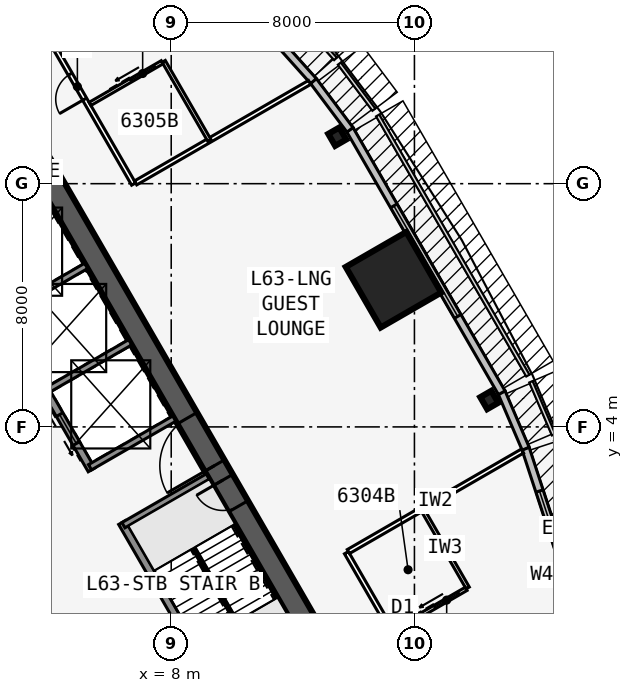
"""IFC4 building model, lengths in metres.
Left out: names, types, materials, properties, quantities, classifications, styles, units other than length and angle.
Written with IfcOpenShell. Run it as: python <this file> out.ifc"""

import sys

from ifc_helpers import new_model, si_unit, direction, frame, frame_2d, origin, origin_2d, place, context, subcontext, project, spatial, rectangle, i_section, extrude, element, fill, save


model = new_model("IFC4")
c1 = context("Model", 3, precision=1e-05, world=origin(), true_north=direction((0.0, 1.0)))
c2 = subcontext(c1, "Body", "Model", "MODEL_VIEW")
j1 = project(units=[si_unit("LENGTHUNIT", "METRE"), si_unit("PLANEANGLEUNIT", "RADIAN")], contexts=[c1])
p1 = place(None, origin())
s1 = spatial("IfcSite", under=j1, at=p1, CompositionType="ELEMENT")
p2 = place(p1, origin())
s2 = spatial("IfcBuilding", under=s1, at=p2, CompositionType="ELEMENT")
p3 = place(p2, frame((0.0, 0.0, 239.3)))
s3 = spatial("IfcBuildingStorey", under=s2, at=p3, CompositionType="ELEMENT", Elevation=239.3)
p4 = place(p3, frame((16.5, -9.526, 0.0), z_axis=(0.0, 0.0, 1.0), x_axis=(-0.499999749417, 0.866025548458, 0.0)))
e1 = element("IfcWall", 1, at=p4, inside=s3, PredefinedType="SHEAR", context=c2, shape_type="SweptSolid", body=[
    extrude(rectangle(XDim=33.0, YDim=0.75, at=frame_2d((16.5, 0.0))), origin(), (0.0, 0.0, 1.0), 3.6),
])
p5 = place(p4, frame((14.15, 0.0, 0.0)))
e2 = element("IfcOpeningElement", 2, at=p5, cuts=e1, PredefinedType="OPENING", context=c2, shape_type="SweptSolid", body=[
    extrude(rectangle(XDim=1.8, YDim=2.13, at=frame_2d((0.9, 1.065))), frame((0.0, 0.385, 0.0), z_axis=(0.0, -1.0, 0.0), x_axis=(1.0, 0.0, 0.0)), (0.0, 0.0, 1.0), 0.77),
])
p6 = place(p4, frame((12.6, 0.0, 0.0)))
e3 = element("IfcOpeningElement", 3, at=p6, cuts=e1, PredefinedType="OPENING", context=c2, shape_type="SweptSolid", body=[
    extrude(rectangle(XDim=1.0, YDim=2.13, at=frame_2d((0.5, 1.065))), frame((0.0, 0.385, 0.0), z_axis=(0.0, -1.0, 0.0), x_axis=(1.0, 0.0, 0.0)), (0.0, 0.0, 1.0), 0.77),
])
p7 = place(p3, frame((10.245, -5.843, 0.0), z_axis=(0.0, 0.0, 1.0), x_axis=(-0.499993009313, 0.866029439822, 0.0)))
e4 = element("IfcWall", 4, at=p7, inside=s3, PredefinedType="SOLIDWALL", context=c2, shape_type="SweptSolid", body=[
    extrude(rectangle(XDim=7.733, YDim=0.25, at=frame_2d((3.866, 0.0))), origin(), (0.0, 0.0, 1.0), 3.435),
])
p8 = place(p3, frame((5.379, 2.586, 0.0), z_axis=(0.0, 0.0, 1.0), x_axis=(-0.500001375892, 0.866024609411, 0.0)))
e5 = element("IfcWall", 5, at=p8, inside=s3, PredefinedType="SOLIDWALL", context=c2, shape_type="SweptSolid", body=[
    extrude(rectangle(XDim=10.633, YDim=0.25, at=frame_2d((5.316, 0.0))), origin(), (0.0, 0.0, 1.0), 3.435),
])
p9 = place(p8, frame((9.164, 0.0, 0.0)))
e6 = element("IfcOpeningElement", 6, at=p9, cuts=e5, PredefinedType="OPENING", context=c2, shape_type="SweptSolid", body=[
    extrude(rectangle(XDim=0.9, YDim=2.13, at=frame_2d((0.45, 1.065))), frame((0.0, 0.135, 0.0), z_axis=(0.0, -1.0, 0.0), x_axis=(1.0, 0.0, 0.0)), (0.0, 0.0, 1.0), 0.27),
])
p10 = place(p8, frame((1.0, 0.0, 0.0)))
e7 = element("IfcOpeningElement", 7, at=p10, cuts=e5, PredefinedType="OPENING", context=c2, shape_type="SweptSolid", body=[
    extrude(rectangle(XDim=1.1, YDim=2.13, at=frame_2d((0.55, 1.065))), frame((0.0, 0.135, 0.0), z_axis=(0.0, -1.0, 0.0), x_axis=(1.0, 0.0, 0.0)), (0.0, 0.0, 1.0), 0.27),
])
p11 = place(p8, frame((3.9, 0.0, 0.0)))
e8 = element("IfcOpeningElement", 8, at=p11, cuts=e5, PredefinedType="OPENING", context=c2, shape_type="SweptSolid", body=[
    extrude(rectangle(XDim=1.1, YDim=2.13, at=frame_2d((0.55, 1.065))), frame((0.0, 0.135, 0.0), z_axis=(0.0, -1.0, 0.0), x_axis=(1.0, 0.0, 0.0)), (0.0, 0.0, 1.0), 0.27),
])
p12 = place(p8, frame((6.8, 0.0, 0.0)))
e9 = element("IfcOpeningElement", 9, at=p12, cuts=e5, PredefinedType="OPENING", context=c2, shape_type="SweptSolid", body=[
    extrude(rectangle(XDim=1.1, YDim=2.13, at=frame_2d((0.55, 1.065))), frame((0.0, 0.135, 0.0), z_axis=(0.0, -1.0, 0.0), x_axis=(1.0, 0.0, 0.0)), (0.0, 0.0, 1.0), 0.27),
])
p13 = place(p3, frame((6.429, 0.767, 0.0), z_axis=(0.0, 0.0, 1.0), x_axis=(0.866042017984, 0.499971222258, 0.0)))
e10 = element("IfcWall", 10, at=p13, inside=s3, PredefinedType="SOLIDWALL", context=c2, shape_type="SweptSolid", body=[
    extrude(rectangle(XDim=3.2, YDim=0.2, at=frame_2d((1.6, 0.0))), origin(), (0.0, 0.0, 1.0), 3.435),
])
p14 = place(p3, frame((5.329, 2.673, 0.0), z_axis=(0.0, 0.0, 1.0), x_axis=(0.866022944154, 0.50000426018, 0.0)))
e11 = element("IfcWall", 11, at=p14, inside=s3, PredefinedType="SOLIDWALL", context=c2, shape_type="SweptSolid", body=[
    extrude(rectangle(XDim=3.2, YDim=0.2, at=frame_2d((1.6, 0.0))), origin(), (0.0, 0.0, 1.0), 3.435),
])
for number, where, z_axis, x_axis in (
    (12, (3.879, 5.184, 0.0), (0.0, 0.0, 1.0), (0.866, 0.5, 0.0)),
    (13, (2.429, 7.696, 0.0), (0.0, 0.0, 1.0), (0.866, 0.5, 0.0)),
):
    element("IfcWall", number, at=place(p3, frame(where, z_axis=z_axis, x_axis=x_axis)), inside=s3, PredefinedType="SOLIDWALL", context=c2, shape_type="SweptSolid", body=[
        extrude(rectangle(XDim=3.2, YDim=0.2, at=frame_2d((1.6, 0.0))), origin(), (0.0, 0.0, 1.0), 3.435),
    ])
for number, where, z_axis, x_axis in (
    (14, (18.461, 4.885, 0.0), (0.0, 0.0, 1.0), (0.866, 0.5, 0.0)),
    (15, (13.461, 13.545, 0.0), (0.0, 0.0, 1.0), (0.866, 0.5, 0.0)),
):
    element("IfcColumn", number, at=place(p3, frame(where, z_axis=z_axis, x_axis=x_axis)), inside=s3, PredefinedType="COLUMN", context=c2, shape_type="SweptSolid", body=[
        extrude(i_section(OverallWidth=0.419, OverallDepth=0.455, WebThickness=0.042, FlangeThickness=0.068, at=origin_2d()), origin(), (0.0, 0.0, 1.0), 3.6),
    ])
p15 = place(p3, frame((15.312, 8.84, 0.0), z_axis=(0.0, 0.0, 1.0), x_axis=(0.866025403784, 0.5, 0.0)))
e16 = element("IfcColumn", 16, at=p15, inside=s3, PredefinedType="COLUMN", context=c2, shape_type="SweptSolid", body=[
    extrude(rectangle(XDim=2.3, YDim=2.3, at=origin_2d()), origin(), (0.0, 0.0, 1.0), 3.6),
])
p16 = place(p3, frame((21.881, -3.503, 0.0), z_axis=(0.0, 0.0, 1.0), x_axis=(-0.311328857048, 0.95030223759, 0.0)))
e17 = element("IfcWall", 17, at=p16, inside=s3, PredefinedType="STANDARD", context=c2, shape_type="SweptSolid", body=[
    extrude(rectangle(XDim=7.153, YDim=0.25, at=frame_2d((3.576, 0.0))), origin(), (0.0, 0.0, 1.0), 3.435),
])
p17 = place(p16, frame((1.476, 0.0, 0.45)))
e18 = element("IfcOpeningElement", 18, at=p17, cuts=e17, PredefinedType="OPENING", context=c2, shape_type="SweptSolid", body=[
    extrude(rectangle(XDim=4.2, YDim=2.6, at=frame_2d((2.1, 1.3))), frame((0.0, 0.135, 0.0), z_axis=(0.0, -1.0, 0.0), x_axis=(1.0, 0.0, 0.0)), (0.0, 0.0, 1.0), 0.27),
])
p18 = place(p3, frame((19.658, 3.284, 0.0), z_axis=(0.0, 0.0, 1.0), x_axis=(-0.393290226175, 0.91941437774, 0.0)))
e19 = element("IfcWall", 19, at=p18, inside=s3, PredefinedType="STANDARD", context=c2, shape_type="SweptSolid", body=[
    extrude(rectangle(XDim=2.014, YDim=0.25, at=frame_2d((1.007, 0.0))), origin(), (0.0, 0.0, 1.0), 3.435),
])
p19 = place(p3, frame((18.873, 5.123, 0.0), z_axis=(0.0, 0.0, 1.0), x_axis=(-0.499993662806, 0.866029062534, 0.0)))
e20 = element("IfcWall", 20, at=p19, inside=s3, PredefinedType="STANDARD", context=c2, shape_type="SweptSolid", body=[
    extrude(rectangle(XDim=10.0, YDim=0.25, at=frame_2d((5.0, 0.0))), origin(), (0.0, 0.0, 1.0), 3.435),
])
p20 = place(p19, frame((2.9, 0.0, 0.45)))
e21 = element("IfcOpeningElement", 21, at=p20, cuts=e20, PredefinedType="OPENING", context=c2, shape_type="SweptSolid", body=[
    extrude(rectangle(XDim=4.2, YDim=2.6, at=frame_2d((2.1, 1.3))), frame((0.0, 0.135, 0.0), z_axis=(0.0, -1.0, 0.0), x_axis=(1.0, 0.0, 0.0)), (0.0, 0.0, 1.0), 0.27),
])
p21 = place(p3, frame((13.881, 13.771, 0.0), z_axis=(0.0, 0.0, 1.0), x_axis=(-0.599650843534, 0.800261748335, 0.0)))
e22 = element("IfcWall", 22, at=p21, inside=s3, PredefinedType="STANDARD", context=c2, shape_type="SweptSolid", body=[
    extrude(rectangle(XDim=2.014, YDim=0.25, at=frame_2d((1.007, 0.0))), origin(), (0.0, 0.0, 1.0), 3.435),
])
p22 = place(p3, frame((12.68, 15.374, 0.0), z_axis=(0.0, 0.0, 1.0), x_axis=(-0.667303550892, 0.744785855778, 0.0)))
e23 = element("IfcWall", 23, at=p22, inside=s3, PredefinedType="STANDARD", context=c2, shape_type="SweptSolid", body=[
    extrude(rectangle(XDim=7.153, YDim=0.25, at=frame_2d((3.576, 0.0))), origin(), (0.0, 0.0, 1.0), 3.435),
])
p23 = place(p22, frame((1.476, 0.0, 0.45)))
e24 = element("IfcOpeningElement", 24, at=p23, cuts=e23, PredefinedType="OPENING", context=c2, shape_type="SweptSolid", body=[
    extrude(rectangle(XDim=4.2, YDim=2.6, at=frame_2d((2.1, 1.3))), frame((0.0, 0.135, 0.0), z_axis=(0.0, -1.0, 0.0), x_axis=(1.0, 0.0, 0.0)), (0.0, 0.0, 1.0), 0.27),
])
p24 = place(p3, frame((20.102, -11.115, 0.0), z_axis=(0.0, 0.0, 1.0), x_axis=(-0.500001960654, 0.866024271797, 0.0)))
e25 = element("IfcWall", 25, at=p24, inside=s3, PredefinedType="PARTITIONING", context=c2, shape_type="SweptSolid", body=[
    extrude(rectangle(XDim=12.677, YDim=0.15, at=frame_2d((6.339, 0.0))), origin(), (0.0, 0.0, 1.0), 3.435),
])
p25 = place(p24, frame((8.502, 0.0, 0.0)))
e26 = element("IfcOpeningElement", 26, at=p25, cuts=e25, PredefinedType="OPENING", context=c2, shape_type="SweptSolid", body=[
    extrude(rectangle(XDim=0.95, YDim=2.13, at=frame_2d((0.475, 1.065))), frame((0.0, 0.085, 0.0), z_axis=(0.0, -1.0, 0.0), x_axis=(1.0, 0.0, 0.0)), (0.0, 0.0, 1.0), 0.17),
])
p26 = place(p3, frame((6.763, 11.988, 0.0), z_axis=(0.0, 0.0, 1.0), x_axis=(-0.49999585592, 0.866027796357, 0.0)))
e27 = element("IfcWall", 27, at=p26, inside=s3, PredefinedType="PARTITIONING", context=c2, shape_type="SweptSolid", body=[
    extrude(rectangle(XDim=12.677, YDim=0.15, at=frame_2d((6.338, 0.0))), origin(), (0.0, 0.0, 1.0), 3.435),
])
p27 = place(p26, frame((3.225, 0.0, 0.0)))
e28 = element("IfcOpeningElement", 28, at=p27, cuts=e27, PredefinedType="OPENING", context=c2, shape_type="SweptSolid", body=[
    extrude(rectangle(XDim=0.95, YDim=2.13, at=frame_2d((0.475, 1.065))), frame((0.0, 0.085, 0.0), z_axis=(0.0, -1.0, 0.0), x_axis=(1.0, 0.0, 0.0)), (0.0, 0.0, 1.0), 0.17),
])
p28 = place(p3, frame((13.829, -0.099, 0.0), z_axis=(0.0, 0.0, 1.0), x_axis=(0.866022562216, 0.500004921708, 0.0)))
e29 = element("IfcWall", 29, at=p28, inside=s3, PredefinedType="PARTITIONING", context=c2, shape_type="SweptSolid", body=[
    extrude(rectangle(XDim=6.609, YDim=0.15, at=frame_2d((3.304, 0.0))), origin(), (0.0, 0.0, 1.0), 2.678),
])
p29 = place(p3, frame((6.829, 12.025, 0.0), z_axis=(0.0, 0.0, 1.0), x_axis=(0.866029323189, 0.499993211332, 0.0)))
e30 = element("IfcWall", 30, at=p29, inside=s3, PredefinedType="PARTITIONING", context=c2, shape_type="SweptSolid", body=[
    extrude(rectangle(XDim=6.608, YDim=0.15, at=frame_2d((3.304, 0.0))), origin(), (0.0, 0.0, 1.0), 2.678),
])
p30 = place(p3, frame((17.753, -1.297, 0.0), z_axis=(0.0, 0.0, 1.0), x_axis=(-0.499990139034, 0.866031096941, 0.0)))
e31 = element("IfcWall", 31, at=p30, inside=s3, PredefinedType="PLUMBINGWALL", context=c2, shape_type="SweptSolid", body=[
    extrude(rectangle(XDim=3.0, YDim=0.12, at=frame_2d((1.5, 0.0))), origin(), (0.0, 0.0, 1.0), 3.435),
])
p31 = place(p3, frame((15.329, -2.697, 0.0), z_axis=(0.0, 0.0, 1.0), x_axis=(0.866035715982, 0.499982138324, 0.0)))
e32 = element("IfcWall", 32, at=p31, inside=s3, PredefinedType="PLUMBINGWALL", context=c2, shape_type="SweptSolid", body=[
    extrude(rectangle(XDim=2.74, YDim=0.12, at=frame_2d((1.37, 0.0))), origin(), (0.0, 0.0, 1.0), 3.435),
])
p32 = place(p31, frame((1.55, 0.0, 0.0)))
e33 = element("IfcOpeningElement", 33, at=p32, cuts=e32, PredefinedType="OPENING", context=c2, shape_type="SweptSolid", body=[
    extrude(rectangle(XDim=0.9, YDim=2.13, at=frame_2d((0.45, 1.065))), frame((0.0, 0.07, 0.0), z_axis=(0.0, -1.0, 0.0), x_axis=(1.0, 0.0, 0.0)), (0.0, 0.0, 1.0), 0.14),
])
p33 = place(p3, frame((9.253, 13.425, 0.0), z_axis=(0.0, 0.0, 1.0), x_axis=(-0.499990139034, 0.866031096941, 0.0)))
e34 = element("IfcWall", 34, at=p33, inside=s3, PredefinedType="PLUMBINGWALL", context=c2, shape_type="SweptSolid", body=[
    extrude(rectangle(XDim=3.0, YDim=0.12, at=frame_2d((1.5, 0.0))), origin(), (0.0, 0.0, 1.0), 3.435),
])
p34 = place(p3, frame((5.329, 14.623, 0.0), z_axis=(0.0, 0.0, 1.0), x_axis=(0.865997131366, 0.500048966069, 0.0)))
e35 = element("IfcWall", 35, at=p34, inside=s3, PredefinedType="PLUMBINGWALL", context=c2, shape_type="SweptSolid", body=[
    extrude(rectangle(XDim=2.74, YDim=0.12, at=frame_2d((1.37, 0.0))), origin(), (0.0, 0.0, 1.0), 3.435),
])
p35 = place(p34, frame((1.55, 0.0, 0.0)))
e36 = element("IfcOpeningElement", 36, at=p35, cuts=e35, PredefinedType="OPENING", context=c2, shape_type="SweptSolid", body=[
    extrude(rectangle(XDim=0.9, YDim=2.13, at=frame_2d((0.45, 1.065))), frame((0.0, 0.07, 0.0), z_axis=(0.0, -1.0, 0.0), x_axis=(1.0, 0.0, 0.0)), (0.0, 0.0, 1.0), 0.14),
])
p36 = place(p3, frame((10.135, -2.401, 0.0), z_axis=(0.0, 0.0, 1.0), x_axis=(-0.499992232847, 0.866029888106, 0.0)))
e37 = element("IfcWall", 37, at=p36, inside=s3, PredefinedType="SOLIDWALL", context=c2, shape_type="SweptSolid", body=[
    extrude(rectangle(XDim=2.794, YDim=0.1, at=frame_2d((1.397, 0.0))), origin(), (0.0, 0.0, 1.0), 3.6),
])
p37 = place(p17, origin())
e38 = element("IfcWindow", 38, at=p37, inside=s3, PartitioningType="SINGLE_PANEL", PredefinedType="WINDOW", context=c2, shape_type="SweptSolid", body=[
    extrude(rectangle(XDim=4.2, YDim=2.6, at=frame_2d((2.1, 1.3))), frame((0.0, 0.03, 0.0), z_axis=(0.0, -1.0, 0.0), x_axis=(1.0, 0.0, 0.0)), (0.0, 0.0, 1.0), 0.06),
])
fill(e18, e38)
p38 = place(p20, origin())
e39 = element("IfcWindow", 39, at=p38, inside=s3, PartitioningType="SINGLE_PANEL", PredefinedType="WINDOW", context=c2, shape_type="SweptSolid", body=[
    extrude(rectangle(XDim=4.2, YDim=2.6, at=frame_2d((2.1, 1.3))), frame((0.0, 0.03, 0.0), z_axis=(0.0, -1.0, 0.0), x_axis=(1.0, 0.0, 0.0)), (0.0, 0.0, 1.0), 0.06),
])
fill(e21, e39)
p39 = place(p32, origin())
e40 = element("IfcDoor", 40, at=p39, inside=s3, OperationType="SLIDING_TO_LEFT", PredefinedType="DOOR", context=c2, shape_type="SweptSolid", body=[
    extrude(rectangle(XDim=0.9, YDim=2.13, at=frame_2d((0.45, 1.065))), frame((0.0, 0.025, 0.0), z_axis=(0.0, -1.0, 0.0), x_axis=(1.0, 0.0, 0.0)), (0.0, 0.0, 1.0), 0.05),
])
fill(e33, e40)
p40 = place(p35, origin())
e41 = element("IfcDoor", 41, at=p40, inside=s3, OperationType="SLIDING_TO_LEFT", PredefinedType="DOOR", context=c2, shape_type="SweptSolid", body=[
    extrude(rectangle(XDim=0.9, YDim=2.13, at=frame_2d((0.45, 1.065))), frame((0.0, 0.025, 0.0), z_axis=(0.0, -1.0, 0.0), x_axis=(1.0, 0.0, 0.0)), (0.0, 0.0, 1.0), 0.05),
])
fill(e36, e41)
p41 = place(p27, origin())
e42 = element("IfcDoor", 42, at=p41, inside=s3, OperationType="SINGLE_SWING_LEFT", PredefinedType="DOOR", context=c2, shape_type="SweptSolid", body=[
    extrude(rectangle(XDim=0.95, YDim=2.13, at=frame_2d((0.475, 1.065))), frame((0.0, 0.025, 0.0), z_axis=(0.0, -1.0, 0.0), x_axis=(1.0, 0.0, 0.0)), (0.0, 0.0, 1.0), 0.05),
])
fill(e28, e42)
p42 = place(p5, origin())
e43 = element("IfcDoor", 43, at=p42, inside=s3, OperationType="DOUBLE_DOOR_SINGLE_SWING", PredefinedType="DOOR", context=c2, shape_type="SweptSolid", body=[
    extrude(rectangle(XDim=1.8, YDim=2.13, at=frame_2d((0.9, 1.065))), frame((0.0, 0.025, 0.0), z_axis=(0.0, -1.0, 0.0), x_axis=(1.0, 0.0, 0.0)), (0.0, 0.0, 1.0), 0.05),
])
fill(e2, e43)
p43 = place(p6, origin())
e44 = element("IfcDoor", 44, at=p43, inside=s3, OperationType="SINGLE_SWING_RIGHT", PredefinedType="DOOR", context=c2, shape_type="SweptSolid", body=[
    extrude(rectangle(XDim=1.0, YDim=2.13, at=frame_2d((0.5, 1.065))), frame((0.0, 0.025, 0.0), z_axis=(0.0, -1.0, 0.0), x_axis=(1.0, 0.0, 0.0)), (0.0, 0.0, 1.0), 0.05),
])
fill(e3, e44)
p44 = place(p10, origin())
e45 = element("IfcDoor", 45, at=p44, inside=s3, OperationType="DOUBLE_DOOR_SLIDING", PredefinedType="USERDEFINED", context=c2, shape_type="SweptSolid", body=[
    extrude(rectangle(XDim=1.1, YDim=2.13, at=frame_2d((0.55, 1.065))), frame((0.0, 0.025, 0.0), z_axis=(0.0, -1.0, 0.0), x_axis=(1.0, 0.0, 0.0)), (0.0, 0.0, 1.0), 0.05),
])
fill(e7, e45)
save(model, sys.argv[1])
